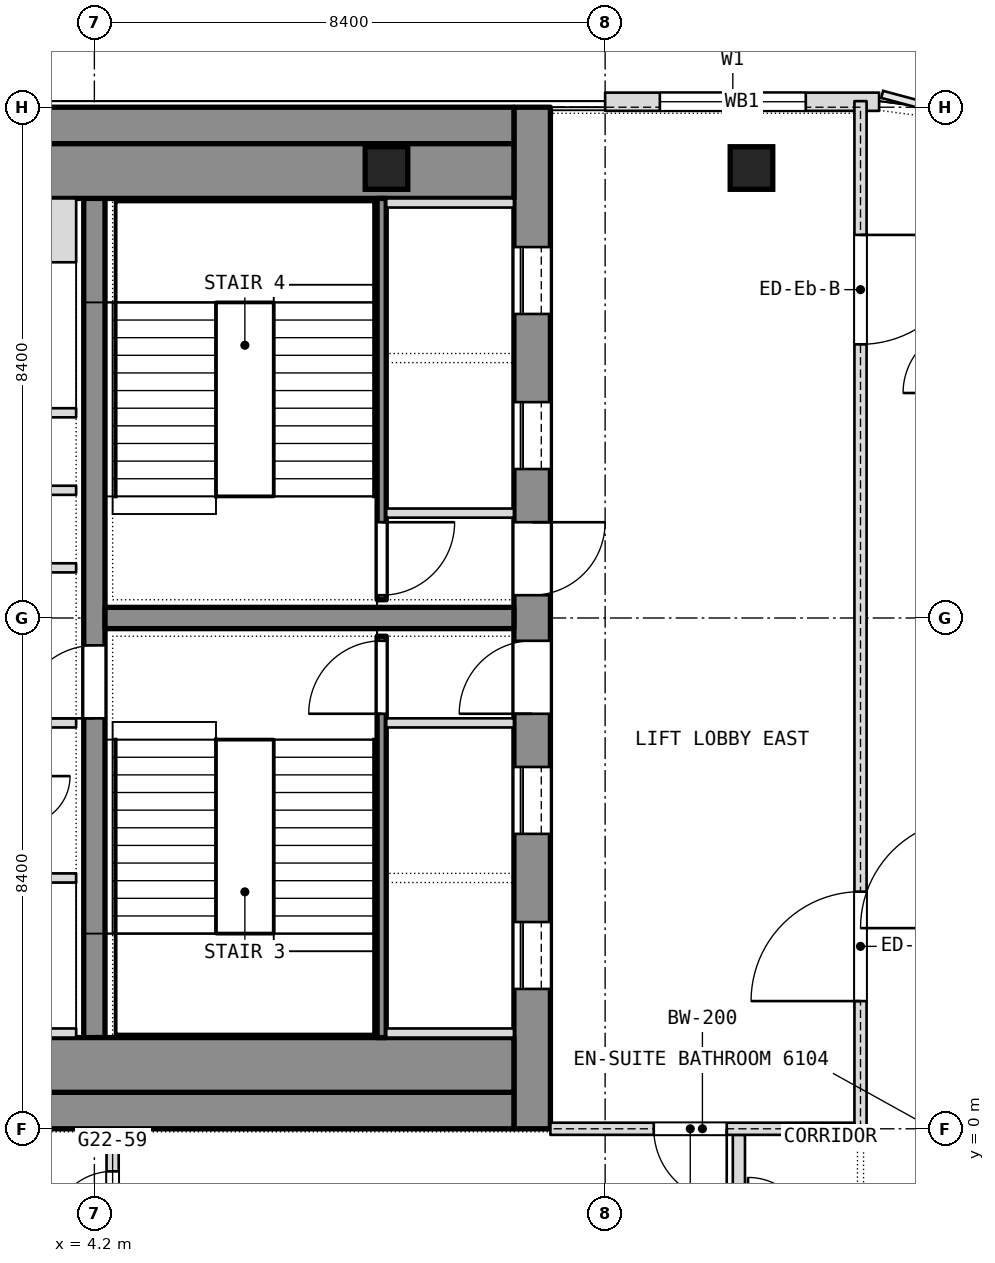
"""IFC4 building model, lengths in metres.
Left out: names, types, materials, properties, quantities, classifications, styles, units other than length and angle.
Written with IfcOpenShell. Run it as: python <this file> out.ifc"""

import sys

from ifc_helpers import new_model, si_unit, direction, frame, frame_2d, origin, origin_2d, place, context, subcontext, project, spatial, rectangle, extrude, element, fill, save


model = new_model("IFC4")
c1 = context("Model", 3, precision=1e-05, world=origin(), true_north=direction((0.0, 1.0)))
c2 = subcontext(c1, "Body", "Model", "MODEL_VIEW")
j1 = project(units=[si_unit("LENGTHUNIT", "METRE"), si_unit("PLANEANGLEUNIT", "RADIAN")], contexts=[c1])
p1 = place(None, origin())
s1 = spatial("IfcSite", under=j1, at=p1, CompositionType="ELEMENT")
p2 = place(p1, origin())
s2 = spatial("IfcBuilding", under=s1, at=p2, CompositionType="ELEMENT")
p3 = place(p2, frame((0.0, 0.0, 266.9)))
s3 = spatial("IfcBuildingStorey", under=s2, at=p3, CompositionType="ELEMENT", Elevation=266.9)
p4 = place(p3, frame((11.4, 0.0, 0.0), z_axis=(0.0, 0.0, 1.0), x_axis=(0.0, 1.0, 0.0)))
e1 = element("IfcWall", 1, at=p4, inside=s3, PredefinedType="SHEAR", context=c2, shape_type="SweptSolid", body=[
    extrude(rectangle(XDim=16.8, YDim=0.6, at=frame_2d((8.4, 0.0))), origin(), (0.0, 0.0, 1.0), 3.6),
])
p5 = place(p4, frame((2.3, 0.0, 0.0)))
e2 = element("IfcOpeningElement", 2, at=p5, cuts=e1, PredefinedType="OPENING", context=c2, shape_type="SweptSolid", body=[
    extrude(rectangle(XDim=1.1, YDim=2.1, at=frame_2d((0.55, 1.05))), frame((0.0, 0.3, 0.0), z_axis=(0.0, -1.0, 0.0), x_axis=(1.0, 0.0, 0.0)), (0.0, 0.0, 1.0), 0.6),
])
p6 = place(p4, frame((4.85, 0.0, 0.0)))
e3 = element("IfcOpeningElement", 3, at=p6, cuts=e1, PredefinedType="OPENING", context=c2, shape_type="SweptSolid", body=[
    extrude(rectangle(XDim=1.1, YDim=2.1, at=frame_2d((0.55, 1.05))), frame((0.0, 0.3, 0.0), z_axis=(0.0, -1.0, 0.0), x_axis=(1.0, 0.0, 0.0)), (0.0, 0.0, 1.0), 0.6),
])
p7 = place(p4, frame((6.825, 0.0, 0.0)))
e4 = element("IfcOpeningElement", 4, at=p7, cuts=e1, PredefinedType="OPENING", context=c2, shape_type="SweptSolid", body=[
    extrude(rectangle(XDim=1.2, YDim=2.1, at=frame_2d((0.6, 1.05))), frame((0.0, 0.3, 0.0), z_axis=(0.0, -1.0, 0.0), x_axis=(1.0, 0.0, 0.0)), (0.0, 0.0, 1.0), 0.6),
])
p8 = place(p4, frame((13.4, 0.0, 0.0)))
e5 = element("IfcOpeningElement", 5, at=p8, cuts=e1, PredefinedType="OPENING", context=c2, shape_type="SweptSolid", body=[
    extrude(rectangle(XDim=1.1, YDim=2.1, at=frame_2d((0.55, 1.05))), frame((0.0, 0.3, 0.0), z_axis=(0.0, -1.0, 0.0), x_axis=(1.0, 0.0, 0.0)), (0.0, 0.0, 1.0), 0.6),
])
p9 = place(p4, frame((10.85, 0.0, 0.0)))
e6 = element("IfcOpeningElement", 6, at=p9, cuts=e1, PredefinedType="OPENING", context=c2, shape_type="SweptSolid", body=[
    extrude(rectangle(XDim=1.1, YDim=2.1, at=frame_2d((0.55, 1.05))), frame((0.0, 0.3, 0.0), z_axis=(0.0, -1.0, 0.0), x_axis=(1.0, 0.0, 0.0)), (0.0, 0.0, 1.0), 0.6),
])
p10 = place(p4, frame((8.775, 0.0, 0.0)))
e7 = element("IfcOpeningElement", 7, at=p10, cuts=e1, PredefinedType="OPENING", context=c2, shape_type="SweptSolid", body=[
    extrude(rectangle(XDim=1.2, YDim=2.1, at=frame_2d((0.6, 1.05))), frame((0.0, 0.3, 0.0), z_axis=(0.0, -1.0, 0.0), x_axis=(1.0, 0.0, 0.0)), (0.0, 0.0, 1.0), 0.6),
])
for number, where, z_axis, x_axis in (
    (8, (-11.1, 0.3, 0.0), (0.0, 0.0, 1.0), (1.0, 0.0, 0.0)),
    (9, (-11.1, 16.5, 0.0), (0.0, 0.0, 1.0), (1.0, 0.0, 0.0)),
):
    element("IfcWall", number, at=place(p3, frame(where, z_axis=z_axis, x_axis=x_axis)), inside=s3, PredefinedType="SHEAR", context=c2, shape_type="SweptSolid", body=[
        extrude(rectangle(XDim=22.2, YDim=0.6, at=frame_2d((11.1, 0.0))), origin(), (0.0, 0.0, 1.0), 3.6),
    ])
p11 = place(p3, frame((4.2, 0.6, 0.0), z_axis=(0.0, 0.0, 1.0), x_axis=(0.0, 1.0, 0.0)))
e10 = element("IfcWall", 10, at=p11, inside=s3, PredefinedType="SHEAR", context=c2, shape_type="SweptSolid", body=[
    extrude(rectangle(XDim=15.6, YDim=0.35, at=frame_2d((7.8, 0.0))), origin(), (0.0, 0.0, 1.0), 3.6),
])
p12 = place(p11, frame((6.15, 0.0, 0.0)))
e11 = element("IfcOpeningElement", 11, at=p12, cuts=e10, PredefinedType="OPENING", context=c2, shape_type="SweptSolid", body=[
    extrude(rectangle(XDim=1.2, YDim=2.1, at=frame_2d((0.6, 1.05))), frame((0.0, 0.175, 0.0), z_axis=(0.0, -1.0, 0.0), x_axis=(1.0, 0.0, 0.0)), (0.0, 0.0, 1.0), 0.35),
])
p13 = place(p3, frame((4.375, 8.4, 0.0), z_axis=(0.0, 0.0, 1.0), x_axis=(1.0, 0.0, 0.0)))
e12 = element("IfcWall", 12, at=p13, inside=s3, PredefinedType="SHEAR", context=c2, shape_type="SweptSolid", body=[
    extrude(rectangle(XDim=6.725, YDim=0.35, at=frame_2d((3.363, 0.0))), origin(), (0.0, 0.0, 1.0), 3.6),
])
for number, where, z_axis, x_axis in (
    (13, (9.004, 15.8, 0.0), (0.0, 0.0, 1.0), (1.0, 0.0, 0.0)),
    (14, (15.007, 15.8, 0.0), (0.0, 0.0, 1.0), (1.0, 0.0, 0.0)),
):
    element("IfcColumn", number, at=place(p3, frame(where, z_axis=z_axis, x_axis=x_axis)), inside=s3, PredefinedType="COLUMN", context=c2, shape_type="SweptSolid", body=[
        extrude(rectangle(XDim=0.7, YDim=0.7, at=origin_2d()), origin(), (0.0, 0.0, 1.0), 3.6),
    ])
p14 = place(p3, frame((14.8, -1.7, 0.0), z_axis=(0.0, 0.0, 1.0), x_axis=(0.0, 1.0, 0.0)))
e15 = element("IfcWall", 15, at=p14, inside=s3, PredefinedType="PARTITIONING", context=c2, shape_type="SweptSolid", body=[
    extrude(rectangle(XDim=1.6, YDim=0.2, at=frame_2d((0.8, 0.0))), origin(), (0.0, 0.0, 1.0), 3.34),
])
p15 = place(p3, frame((4.5, -19.3, 0.0), z_axis=(0.0, 0.0, 1.0), x_axis=(0.0, 1.0, 0.0)))
e16 = element("IfcWall", 16, at=p15, inside=s3, PredefinedType="PARTITIONING", context=c2, shape_type="SweptSolid", body=[
    extrude(rectangle(XDim=19.2, YDim=0.2, at=frame_2d((9.6, 0.0))), origin(), (0.0, 0.0, 1.0), 3.34),
])
p16 = place(p15, frame((17.6, 0.0, 0.0)))
e17 = element("IfcOpeningElement", 17, at=p16, cuts=e16, PredefinedType="OPENING", context=c2, shape_type="SweptSolid", body=[
    extrude(rectangle(XDim=1.0, YDim=2.1, at=frame_2d((0.5, 1.05))), frame((0.0, 0.1, 0.0), z_axis=(0.0, -1.0, 0.0), x_axis=(1.0, 0.0, 0.0)), (0.0, 0.0, 1.0), 0.2),
])
p17 = place(p3, frame((17.106, 16.89, 0.0), z_axis=(0.0, 0.0, 1.0), x_axis=(-1.0, 0.0, 0.0)))
e18 = element("IfcWall", 18, at=p17, inside=s3, PredefinedType="NOTDEFINED", context=c2, shape_type="SweptSolid", body=[
    extrude(rectangle(XDim=4.506, YDim=0.3, at=frame_2d((2.253, 0.0))), origin(), (0.0, 0.0, 1.0), 3.6),
])
p18 = place(p17, frame((1.206, 0.0, 0.9)))
e19 = element("IfcOpeningElement", 19, at=p18, cuts=e18, PredefinedType="OPENING", context=c2, shape_type="SweptSolid", body=[
    extrude(rectangle(XDim=2.4, YDim=2.1, at=frame_2d((1.2, 1.05))), frame((0.0, 0.15, 0.0), z_axis=(0.0, -1.0, 0.0), x_axis=(1.0, 0.0, 0.0)), (0.0, 0.0, 1.0), 0.3),
])
for number, where, z_axis, x_axis in (
    (20, (-11.1, 1.05, 0.0), (0.0, 0.0, 1.0), (1.0, 0.0, 0.0)),
    (21, (-11.1, 15.75, 0.0), (0.0, 0.0, 1.0), (1.0, 0.0, 0.0)),
):
    element("IfcWall", number, at=place(p3, frame(where, z_axis=z_axis, x_axis=x_axis)), inside=s3, PredefinedType="PARTITIONING", context=c2, shape_type="SweptSolid", body=[
        extrude(rectangle(XDim=22.2, YDim=0.9, at=frame_2d((11.1, 0.0))), origin(), (0.0, 0.0, 1.0), 3.34),
    ])
p19 = place(p3, frame((8.925, 1.5, 0.0), z_axis=(0.0, 0.0, 1.0), x_axis=(0.0, 1.0, 0.0)))
e22 = element("IfcWall", 22, at=p19, inside=s3, PredefinedType="SHEAR", context=c2, shape_type="SweptSolid", body=[
    extrude(rectangle(XDim=6.6, YDim=0.15, at=frame_2d((3.3, 0.0))), origin(), (0.0, 0.0, 1.0), 3.34),
])
p20 = place(p19, frame((5.325, 0.0, 0.0)))
e23 = element("IfcOpeningElement", 23, at=p20, cuts=e22, PredefinedType="OPENING", context=c2, shape_type="SweptSolid", body=[
    extrude(rectangle(XDim=1.2, YDim=2.1, at=frame_2d((0.6, 1.05))), frame((0.0, 0.075, 0.0), z_axis=(0.0, -1.0, 0.0), x_axis=(1.0, 0.0, 0.0)), (0.0, 0.0, 1.0), 0.15),
])
for number, where, z_axis, x_axis in (
    (24, (9.0, 6.675, 0.0), (0.0, 0.0, 1.0), (1.0, 0.0, 0.0)),
    (25, (9.0, 1.575, 0.0), (0.0, 0.0, 1.0), (1.0, 0.0, 0.0)),
):
    element("IfcWall", number, at=place(p3, frame(where, z_axis=z_axis, x_axis=x_axis)), inside=s3, PredefinedType="SHEAR", context=c2, shape_type="SweptSolid", body=[
        extrude(rectangle(XDim=2.1, YDim=0.15, at=frame_2d((1.05, 0.0))), origin(), (0.0, 0.0, 1.0), 3.6),
    ])
p21 = place(p3, frame((8.925, 8.7, 0.0), z_axis=(0.0, 0.0, 1.0), x_axis=(0.0, 1.0, 0.0)))
e26 = element("IfcWall", 26, at=p21, inside=s3, PredefinedType="SHEAR", context=c2, shape_type="SweptSolid", body=[
    extrude(rectangle(XDim=6.6, YDim=0.15, at=frame_2d((3.3, 0.0))), origin(), (0.0, 0.0, 1.0), 3.34),
])
p22 = place(p21, frame((0.075, 0.0, 0.0)))
e27 = element("IfcOpeningElement", 27, at=p22, cuts=e26, PredefinedType="OPENING", context=c2, shape_type="SweptSolid", body=[
    extrude(rectangle(XDim=1.2, YDim=2.1, at=frame_2d((0.6, 1.05))), frame((0.0, 0.075, 0.0), z_axis=(0.0, -1.0, 0.0), x_axis=(1.0, 0.0, 0.0)), (0.0, 0.0, 1.0), 0.15),
])
for number, where, z_axis, x_axis in (
    (28, (9.0, 10.125, 0.0), (0.0, 0.0, 1.0), (1.0, 0.0, 0.0)),
    (29, (9.0, 15.225, 0.0), (0.0, 0.0, 1.0), (1.0, 0.0, 0.0)),
):
    element("IfcWall", number, at=place(p3, frame(where, z_axis=z_axis, x_axis=x_axis)), inside=s3, PredefinedType="SHEAR", context=c2, shape_type="SweptSolid", body=[
        extrude(rectangle(XDim=2.1, YDim=0.15, at=frame_2d((1.05, 0.0))), origin(), (0.0, 0.0, 1.0), 3.6),
    ])
p23 = place(p3, frame((-3.9, 4.125, 0.0), z_axis=(0.0, 0.0, 1.0), x_axis=(1.0, 0.0, 0.0)))
e30 = element("IfcWall", 30, at=p23, inside=s3, PredefinedType="PARTITIONING", context=c2, shape_type="SweptSolid", body=[
    extrude(rectangle(XDim=7.8, YDim=0.15, at=frame_2d((3.9, 0.0))), origin(), (0.0, 0.0, 1.0), 3.34),
])
p24 = place(p23, frame((3.75, 0.0, 0.0)))
e31 = element("IfcOpeningElement", 31, at=p24, cuts=e30, PredefinedType="OPENING", context=c2, shape_type="SweptSolid", body=[
    extrude(rectangle(XDim=1.2, YDim=2.1, at=frame_2d((0.6, 1.05))), frame((0.0, 0.075, 0.0), z_axis=(0.0, -1.0, 0.0), x_axis=(1.0, 0.0, 0.0)), (0.0, 0.0, 1.0), 0.15),
])
p25 = place(p3, frame((-3.9, 11.775, 0.0), z_axis=(0.0, 0.0, 1.0), x_axis=(1.0, 0.0, 0.0)))
e32 = element("IfcWall", 32, at=p25, inside=s3, PredefinedType="PARTITIONING", context=c2, shape_type="SweptSolid", body=[
    extrude(rectangle(XDim=7.8, YDim=0.15, at=frame_2d((3.9, 0.0))), origin(), (0.0, 0.0, 1.0), 3.34),
])
p26 = place(p25, frame((3.3, 0.0, 0.0)))
e33 = element("IfcOpeningElement", 33, at=p26, cuts=e32, PredefinedType="OPENING", context=c2, shape_type="SweptSolid", body=[
    extrude(rectangle(XDim=1.2, YDim=2.1, at=frame_2d((0.6, 1.05))), frame((0.0, 0.075, 0.0), z_axis=(0.0, -1.0, 0.0), x_axis=(1.0, 0.0, 0.0)), (0.0, 0.0, 1.0), 0.15),
])
p27 = place(p3, frame((1.65, 1.575, 0.0), z_axis=(0.0, 0.0, 1.0), x_axis=(1.0, 0.0, 0.0)))
e34 = element("IfcWall", 34, at=p27, inside=s3, PredefinedType="SHEAR", context=c2, shape_type="SweptSolid", body=[
    extrude(rectangle(XDim=2.25, YDim=0.15, at=frame_2d((1.125, 0.0))), origin(), (0.0, 0.0, 1.0), 3.6),
])
p28 = place(p3, frame((1.65, 14.775, 0.0), z_axis=(0.0, 0.0, 1.0), x_axis=(1.0, 0.0, 0.0)))
e35 = element("IfcWall", 35, at=p28, inside=s3, PredefinedType="SHEAR", context=c2, shape_type="SweptSolid", body=[
    extrude(rectangle(XDim=2.25, YDim=1.05, at=frame_2d((1.125, 0.0))), origin(), (0.0, 0.0, 1.0), 3.6),
])
for number, where, z_axis, x_axis in (
    (36, (1.65, 6.675, 0.0), (0.0, 0.0, 1.0), (1.0, 0.0, 0.0)),
    (37, (1.65, 9.225, 0.0), (0.0, 0.0, 1.0), (1.0, 0.0, 0.0)),
):
    element("IfcWall", number, at=place(p3, frame(where, z_axis=z_axis, x_axis=x_axis)), inside=s3, PredefinedType="PARTITIONING", context=c2, shape_type="SweptSolid", body=[
        extrude(rectangle(XDim=2.25, YDim=0.15, at=frame_2d((1.125, 0.0))), origin(), (0.0, 0.0, 1.0), 3.34),
    ])
p29 = place(p3, frame((1.8, 10.5, 0.0), z_axis=(0.0, 0.0, 1.0), x_axis=(1.0, 0.0, 0.0)))
e38 = element("IfcWall", 38, at=p29, inside=s3, PredefinedType="PARTITIONING", context=c2, shape_type="SweptSolid", body=[
    extrude(rectangle(XDim=2.1, YDim=0.15, at=frame_2d((1.05, 0.0))), origin(), (0.0, 0.0, 1.0), 3.34),
])
p30 = place(p3, frame((16.8, -0.1, 0.0), z_axis=(0.0, 0.0, 1.0), x_axis=(0.0, 1.0, 0.0)))
e39 = element("IfcWall", 39, at=p30, inside=s3, PredefinedType="PARTITIONING", context=c2, shape_type="SweptSolid", body=[
    extrude(rectangle(XDim=17.0, YDim=0.2, at=frame_2d((8.5, 0.0))), origin(), (0.0, 0.0, 1.0), 3.34),
])
p31 = place(p30, frame((2.2, 0.0, 0.0)))
e40 = element("IfcOpeningElement", 40, at=p31, cuts=e39, PredefinedType="OPENING", context=c2, shape_type="SweptSolid", body=[
    extrude(rectangle(XDim=1.8, YDim=2.1, at=frame_2d((0.9, 1.05))), frame((0.0, 0.1, 0.0), z_axis=(0.0, -1.0, 0.0), x_axis=(1.0, 0.0, 0.0)), (0.0, 0.0, 1.0), 0.2),
])
p32 = place(p30, frame((13.0, 0.0, 0.0)))
e41 = element("IfcOpeningElement", 41, at=p32, cuts=e39, PredefinedType="OPENING", context=c2, shape_type="SweptSolid", body=[
    extrude(rectangle(XDim=1.8, YDim=2.1, at=frame_2d((0.9, 1.05))), frame((0.0, 0.1, 0.0), z_axis=(0.0, -1.0, 0.0), x_axis=(1.0, 0.0, 0.0)), (0.0, 0.0, 1.0), 0.2),
])
p33 = place(p3, frame((11.7, 0.0, 0.0), z_axis=(0.0, 0.0, 1.0), x_axis=(1.0, 0.0, 0.0)))
e42 = element("IfcWall", 42, at=p33, inside=s3, PredefinedType="PARTITIONING", context=c2, shape_type="SweptSolid", body=[
    extrude(rectangle(XDim=5.0, YDim=0.2, at=frame_2d((2.5, 0.0))), origin(), (0.0, 0.0, 1.0), 3.0),
])
p34 = place(p33, frame((1.7, 0.0, 0.0)))
e43 = element("IfcOpeningElement", 43, at=p34, cuts=e42, PredefinedType="OPENING", context=c2, shape_type="SweptSolid", body=[
    extrude(rectangle(XDim=1.2, YDim=2.1, at=frame_2d((0.6, 1.05))), frame((0.0, 0.1, 0.0), z_axis=(0.0, -1.0, 0.0), x_axis=(1.0, 0.0, 0.0)), (0.0, 0.0, 1.0), 0.2),
])
p35 = place(p16, origin())
e44 = element("IfcDoor", 44, at=p35, inside=s3, OperationType="SINGLE_SWING_RIGHT", PredefinedType="DOOR", context=c2, shape_type="SweptSolid", body=[
    extrude(rectangle(XDim=1.0, YDim=2.1, at=frame_2d((0.5, 1.05))), frame((0.0, 0.025, 0.0), z_axis=(0.0, -1.0, 0.0), x_axis=(1.0, 0.0, 0.0)), (0.0, 0.0, 1.0), 0.05),
])
fill(e17, e44)
p36 = place(p18, origin())
e45 = element("IfcWindow", 45, at=p36, inside=s3, PartitioningType="SINGLE_PANEL", PredefinedType="WINDOW", context=c2, shape_type="SweptSolid", body=[
    extrude(rectangle(XDim=2.4, YDim=2.1, at=frame_2d((1.2, 1.05))), frame((0.0, 0.03, 0.0), z_axis=(0.0, -1.0, 0.0), x_axis=(1.0, 0.0, 0.0)), (0.0, 0.0, 1.0), 0.06),
])
fill(e19, e45)
p37 = place(p5, origin())
e46 = element("IfcDoor", 46, at=p37, inside=s3, OperationType="SLIDING_TO_LEFT", PredefinedType="DOOR", context=c2, shape_type="SweptSolid", body=[
    extrude(rectangle(XDim=1.1, YDim=2.1, at=frame_2d((0.55, 1.05))), frame((0.0, 0.025, 0.0), z_axis=(0.0, -1.0, 0.0), x_axis=(1.0, 0.0, 0.0)), (0.0, 0.0, 1.0), 0.05),
])
fill(e2, e46)
p38 = place(p6, origin())
e47 = element("IfcDoor", 47, at=p38, inside=s3, OperationType="SLIDING_TO_LEFT", PredefinedType="DOOR", context=c2, shape_type="SweptSolid", body=[
    extrude(rectangle(XDim=1.1, YDim=2.1, at=frame_2d((0.55, 1.05))), frame((0.0, 0.025, 0.0), z_axis=(0.0, -1.0, 0.0), x_axis=(1.0, 0.0, 0.0)), (0.0, 0.0, 1.0), 0.05),
])
fill(e3, e47)
p39 = place(p7, origin())
e48 = element("IfcDoor", 48, at=p39, inside=s3, OperationType="SINGLE_SWING_LEFT", PredefinedType="DOOR", context=c2, shape_type="SweptSolid", body=[
    extrude(rectangle(XDim=1.2, YDim=2.1, at=frame_2d((0.6, 1.05))), frame((0.0, 0.025, 0.0), z_axis=(0.0, -1.0, 0.0), x_axis=(1.0, 0.0, 0.0)), (0.0, 0.0, 1.0), 0.05),
])
fill(e4, e48)
p40 = place(p20, origin())
e49 = element("IfcDoor", 49, at=p40, inside=s3, OperationType="SINGLE_SWING_LEFT", PredefinedType="DOOR", context=c2, shape_type="SweptSolid", body=[
    extrude(rectangle(XDim=1.2, YDim=2.1, at=frame_2d((0.6, 1.05))), frame((0.0, 0.025, 0.0), z_axis=(0.0, -1.0, 0.0), x_axis=(1.0, 0.0, 0.0)), (0.0, 0.0, 1.0), 0.05),
])
fill(e23, e49)
p41 = place(p8, origin())
e50 = element("IfcDoor", 50, at=p41, inside=s3, OperationType="SLIDING_TO_LEFT", PredefinedType="DOOR", context=c2, shape_type="SweptSolid", body=[
    extrude(rectangle(XDim=1.1, YDim=2.1, at=frame_2d((0.55, 1.05))), frame((0.0, 0.025, 0.0), z_axis=(0.0, -1.0, 0.0), x_axis=(1.0, 0.0, 0.0)), (0.0, 0.0, 1.0), 0.05),
])
fill(e5, e50)
p42 = place(p9, origin())
e51 = element("IfcDoor", 51, at=p42, inside=s3, OperationType="SLIDING_TO_LEFT", PredefinedType="DOOR", context=c2, shape_type="SweptSolid", body=[
    extrude(rectangle(XDim=1.1, YDim=2.1, at=frame_2d((0.55, 1.05))), frame((0.0, 0.025, 0.0), z_axis=(0.0, -1.0, 0.0), x_axis=(1.0, 0.0, 0.0)), (0.0, 0.0, 1.0), 0.05),
])
fill(e6, e51)
p43 = place(p10, origin())
e52 = element("IfcDoor", 52, at=p43, inside=s3, OperationType="SINGLE_SWING_LEFT", PredefinedType="DOOR", context=c2, shape_type="SweptSolid", body=[
    extrude(rectangle(XDim=1.2, YDim=2.1, at=frame_2d((0.6, 1.05))), frame((0.0, 0.025, 0.0), z_axis=(0.0, -1.0, 0.0), x_axis=(1.0, 0.0, 0.0)), (0.0, 0.0, 1.0), 0.05),
])
fill(e7, e52)
p44 = place(p22, origin())
e53 = element("IfcDoor", 53, at=p44, inside=s3, OperationType="SINGLE_SWING_LEFT", PredefinedType="DOOR", context=c2, shape_type="SweptSolid", body=[
    extrude(rectangle(XDim=1.2, YDim=2.1, at=frame_2d((0.6, 1.05))), frame((0.0, 0.025, 0.0), z_axis=(0.0, -1.0, 0.0), x_axis=(1.0, 0.0, 0.0)), (0.0, 0.0, 1.0), 0.05),
])
fill(e27, e53)
p45 = place(p12, origin())
e54 = element("IfcDoor", 54, at=p45, inside=s3, OperationType="SINGLE_SWING_LEFT", PredefinedType="DOOR", context=c2, shape_type="SweptSolid", body=[
    extrude(rectangle(XDim=1.2, YDim=2.1, at=frame_2d((0.6, 1.05))), frame((0.0, 0.025, 0.0), z_axis=(0.0, -1.0, 0.0), x_axis=(1.0, 0.0, 0.0)), (0.0, 0.0, 1.0), 0.05),
])
fill(e11, e54)
p46 = place(p31, origin())
e55 = element("IfcDoor", 55, at=p46, inside=s3, OperationType="DOUBLE_DOOR_SINGLE_SWING", PredefinedType="DOOR", context=c2, shape_type="SweptSolid", body=[
    extrude(rectangle(XDim=1.8, YDim=2.1, at=frame_2d((0.9, 1.05))), frame((0.0, 0.025, 0.0), z_axis=(0.0, -1.0, 0.0), x_axis=(1.0, 0.0, 0.0)), (0.0, 0.0, 1.0), 0.05),
])
fill(e40, e55)
p47 = place(p32, origin())
e56 = element("IfcDoor", 56, at=p47, inside=s3, OperationType="DOUBLE_DOOR_SINGLE_SWING", PredefinedType="DOOR", context=c2, shape_type="SweptSolid", body=[
    extrude(rectangle(XDim=1.8, YDim=2.1, at=frame_2d((0.9, 1.05))), frame((0.0, 0.025, 0.0), z_axis=(0.0, -1.0, 0.0), x_axis=(1.0, 0.0, 0.0)), (0.0, 0.0, 1.0), 0.05),
])
fill(e41, e56)
p48 = place(p34, origin())
e57 = element("IfcDoor", 57, at=p48, inside=s3, OperationType="SINGLE_SWING_LEFT", PredefinedType="DOOR", context=c2, shape_type="SweptSolid", body=[
    extrude(rectangle(XDim=1.2, YDim=2.1, at=frame_2d((0.6, 1.05))), frame((0.0, 0.025, 0.0), z_axis=(0.0, -1.0, 0.0), x_axis=(1.0, 0.0, 0.0)), (0.0, 0.0, 1.0), 0.05),
])
fill(e43, e57)
save(model, sys.argv[1])
